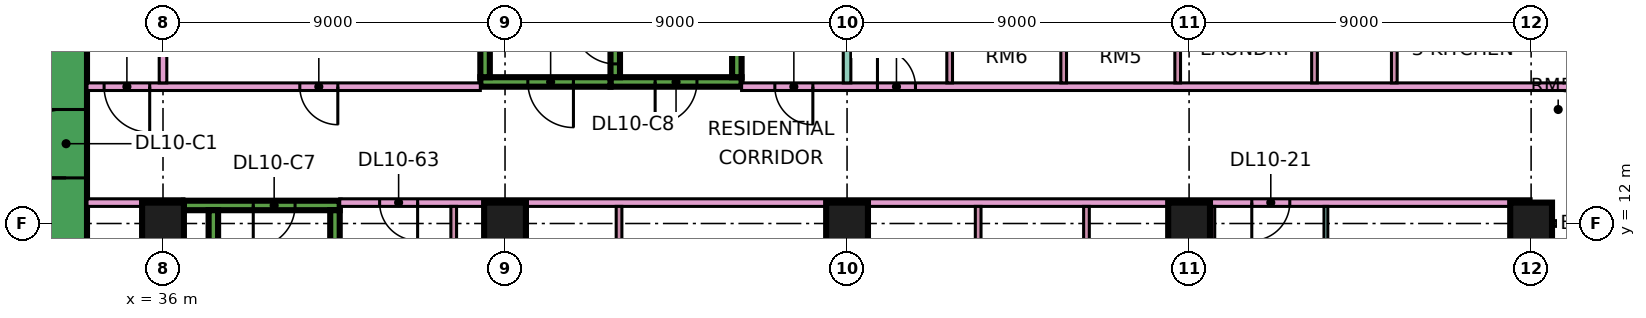
"""IFC4 building model, lengths in metres.
Left out: names, types, materials, properties, quantities, classifications, styles, units other than length and angle.
Written with IfcOpenShell. Run it as: python <this file> out.ifc"""

import sys

from ifc_helpers import new_model, si_unit, direction, frame, frame_2d, origin, origin_2d, place, context, subcontext, project, spatial, rectangle, extrude, element, fill, save


model = new_model("IFC4")
c1 = context("Model", 3, precision=1e-05, world=origin(), true_north=direction((0.0, 1.0)))
c2 = subcontext(c1, "Body", "Model", "MODEL_VIEW")
j1 = project(units=[si_unit("LENGTHUNIT", "METRE"), si_unit("PLANEANGLEUNIT", "RADIAN")], contexts=[c1])
p1 = place(None, origin())
s1 = spatial("IfcSite", under=j1, at=p1, CompositionType="ELEMENT")
p2 = place(p1, origin())
s2 = spatial("IfcBuilding", under=s1, at=p2, CompositionType="ELEMENT")
p3 = place(p2, frame((0.0, 0.0, 52.65)))
s3 = spatial("IfcBuildingStorey", under=s2, at=p3, CompositionType="ELEMENT", Elevation=52.65)
for number, where, z_axis, x_axis in (
    (1, (36.0, 12.0, 0.0), (0.0, 0.0, 1.0), (1.0, 0.0, 0.0)),
    (2, (45.0, 12.0, 0.0), (0.0, 0.0, 1.0), (1.0, 0.0, 0.0)),
    (3, (54.0, 12.0, 0.0), (0.0, 0.0, 1.0), (1.0, 0.0, 0.0)),
    (4, (63.0, 12.0, 0.0), (0.0, 0.0, 1.0), (1.0, 0.0, 0.0)),
    (5, (72.0, 12.0, 0.0), (0.0, 0.0, 1.0), (1.0, 0.0, 0.0)),
):
    element("IfcColumn", number, at=place(p3, frame(where, z_axis=z_axis, x_axis=x_axis)), inside=s3, PredefinedType="COLUMN", context=c2, shape_type="SweptSolid", body=[
        extrude(rectangle(XDim=1.1, YDim=1.1, at=origin_2d()), origin(), (0.0, 0.0, 1.0), 3.75),
    ])
p4 = place(p3, frame((33.45, 8.1, 0.0), z_axis=(0.0, 0.0, 1.0), x_axis=(0.0, 1.0, 0.0)))
e6 = element("IfcWall", 6, at=p4, inside=s3, PredefinedType="SHEAR", context=c2, shape_type="SweptSolid", body=[
    extrude(rectangle(XDim=10.8, YDim=1.1, at=frame_2d((5.4, 0.0))), origin(), (0.0, 0.0, 1.0), 3.75),
])
p5 = place(p4, frame((5.1, 0.0, 0.0)))
e7 = element("IfcOpeningElement", 7, at=p5, cuts=e6, PredefinedType="OPENING", context=c2, shape_type="SweptSolid", body=[
    extrude(rectangle(XDim=1.8, YDim=2.4, at=frame_2d((0.9, 1.2))), frame((0.0, 0.56, 0.0), z_axis=(0.0, -1.0, 0.0), x_axis=(1.0, 0.0, 0.0)), (0.0, 0.0, 1.0), 1.12),
])
p6 = place(p3, frame((36.55, 12.475, 0.0), z_axis=(0.0, 0.0, 1.0), x_axis=(1.0, 0.0, 0.0)))
e8 = element("IfcWall", 8, at=p6, inside=s3, PredefinedType="SHEAR", context=c2, shape_type="SweptSolid", body=[
    extrude(rectangle(XDim=4.1, YDim=0.25, at=frame_2d((2.05, 0.0))), origin(), (0.0, 0.0, 1.0), 3.75),
])
p7 = place(p6, frame((1.825, 0.0, 0.0)))
e9 = element("IfcOpeningElement", 9, at=p7, cuts=e8, PredefinedType="OPENING", context=c2, shape_type="SweptSolid", body=[
    extrude(rectangle(XDim=1.1, YDim=2.2, at=frame_2d((0.55, 1.1))), frame((0.0, 0.135, 0.0), z_axis=(0.0, -1.0, 0.0), x_axis=(1.0, 0.0, 0.0)), (0.0, 0.0, 1.0), 0.27),
])
for number, where, z_axis, x_axis in (
    (10, (37.325, 5.85, 0.0), (0.0, 0.0, 1.0), (0.0, 1.0, 0.0)),
    (11, (40.525, 5.85, 0.0), (0.0, 0.0, 1.0), (0.0, 1.0, 0.0)),
):
    element("IfcWall", number, at=place(p3, frame(where, z_axis=z_axis, x_axis=x_axis)), inside=s3, PredefinedType="SHEAR", context=c2, shape_type="SweptSolid", body=[
        extrude(rectangle(XDim=6.5, YDim=0.25, at=frame_2d((3.25, 0.0))), origin(), (0.0, 0.0, 1.0), 3.75),
    ])
p8 = place(p3, frame((47.775, 15.725, 0.0), z_axis=(0.0, 0.0, 1.0), x_axis=(1.0, 0.0, 0.0)))
e12 = element("IfcWall", 12, at=p8, inside=s3, PredefinedType="SHEAR", context=c2, shape_type="SweptSolid", body=[
    extrude(rectangle(XDim=3.45, YDim=0.25, at=frame_2d((1.725, 0.0))), origin(), (0.0, 0.0, 1.0), 3.75),
])
p9 = place(p8, frame((1.175, 0.0, 0.0)))
e13 = element("IfcOpeningElement", 13, at=p9, cuts=e12, PredefinedType="OPENING", context=c2, shape_type="SweptSolid", body=[
    extrude(rectangle(XDim=1.1, YDim=2.2, at=frame_2d((0.55, 1.1))), frame((0.0, 0.135, 0.0), z_axis=(0.0, -1.0, 0.0), x_axis=(1.0, 0.0, 0.0)), (0.0, 0.0, 1.0), 0.27),
])
p10 = place(p3, frame((47.9, 15.85, 0.0), z_axis=(0.0, 0.0, 1.0), x_axis=(0.0, 1.0, 0.0)))
e14 = element("IfcWall", 14, at=p10, inside=s3, PredefinedType="SHEAR", context=c2, shape_type="SweptSolid", body=[
    extrude(rectangle(XDim=6.5, YDim=0.25, at=frame_2d((3.25, 0.0))), origin(), (0.0, 0.0, 1.0), 3.75),
])
p11 = place(p10, frame((0.35, 0.0, 0.0)))
e15 = element("IfcOpeningElement", 15, at=p11, cuts=e14, PredefinedType="OPENING", context=c2, shape_type="SweptSolid", body=[
    extrude(rectangle(XDim=1.1, YDim=2.2, at=frame_2d((0.55, 1.1))), frame((0.0, 0.135, 0.0), z_axis=(0.0, -1.0, 0.0), x_axis=(1.0, 0.0, 0.0)), (0.0, 0.0, 1.0), 0.27),
])
p12 = place(p3, frame((51.1, 15.85, 0.0), z_axis=(0.0, 0.0, 1.0), x_axis=(0.0, 1.0, 0.0)))
e16 = element("IfcWall", 16, at=p12, inside=s3, PredefinedType="SHEAR", context=c2, shape_type="SweptSolid", body=[
    extrude(rectangle(XDim=6.5, YDim=0.25, at=frame_2d((3.25, 0.0))), origin(), (0.0, 0.0, 1.0), 3.75),
])
p13 = place(p3, frame((44.35, 15.725, 0.0), z_axis=(0.0, 0.0, 1.0), x_axis=(1.0, 0.0, 0.0)))
e17 = element("IfcWall", 17, at=p13, inside=s3, PredefinedType="SHEAR", context=c2, shape_type="SweptSolid", body=[
    extrude(rectangle(XDim=3.425, YDim=0.25, at=frame_2d((1.712, 0.0))), origin(), (0.0, 0.0, 1.0), 3.75),
])
p14 = place(p13, frame((1.25, 0.0, 0.0)))
e18 = element("IfcOpeningElement", 18, at=p14, cuts=e17, PredefinedType="OPENING", context=c2, shape_type="SweptSolid", body=[
    extrude(rectangle(XDim=1.2, YDim=2.2, at=frame_2d((0.6, 1.1))), frame((0.0, 0.135, 0.0), z_axis=(0.0, -1.0, 0.0), x_axis=(1.0, 0.0, 0.0)), (0.0, 0.0, 1.0), 0.27),
])
p15 = place(p3, frame((44.475, 15.85, 0.0), z_axis=(0.0, 0.0, 1.0), x_axis=(0.0, 1.0, 0.0)))
e19 = element("IfcWall", 19, at=p15, inside=s3, PredefinedType="SHEAR", context=c2, shape_type="SweptSolid", body=[
    extrude(rectangle(XDim=6.5, YDim=0.25, at=frame_2d((3.25, 0.0))), origin(), (0.0, 0.0, 1.0), 3.75),
])
p16 = place(p15, frame((1.75, 0.0, 0.0)))
e20 = element("IfcOpeningElement", 20, at=p16, cuts=e19, PredefinedType="OPENING", context=c2, shape_type="SweptSolid", body=[
    extrude(rectangle(XDim=1.1, YDim=2.2, at=frame_2d((0.55, 1.1))), frame((0.0, 0.135, 0.0), z_axis=(0.0, -1.0, 0.0), x_axis=(1.0, 0.0, 0.0)), (0.0, 0.0, 1.0), 0.27),
])
p17 = place(p15, frame((4.3, 0.0, 0.0)))
e21 = element("IfcOpeningElement", 21, at=p17, cuts=e19, PredefinedType="OPENING", context=c2, shape_type="SweptSolid", body=[
    extrude(rectangle(XDim=1.1, YDim=2.2, at=frame_2d((0.55, 1.1))), frame((0.0, 0.135, 0.0), z_axis=(0.0, -1.0, 0.0), x_axis=(1.0, 0.0, 0.0)), (0.0, 0.0, 1.0), 0.27),
])
p18 = place(p3, frame((72.0, 1.575, 0.0), z_axis=(0.0, 0.0, 1.0), x_axis=(0.0, 1.0, 0.0)))
e22 = element("IfcWall", 22, at=p18, inside=s3, PredefinedType="SOLIDWALL", context=c2, shape_type="SweptSolid", body=[
    extrude(rectangle(XDim=10.35, YDim=0.15, at=frame_2d((5.175, 0.0))), origin(), (0.0, 0.0, 1.0), 3.35),
])
p19 = place(p18, frame((1.288, 0.0, 0.0)))
e23 = element("IfcOpeningElement", 23, at=p19, cuts=e22, PredefinedType="OPENING", context=c2, shape_type="SweptSolid", body=[
    extrude(rectangle(XDim=1.8, YDim=2.4, at=frame_2d((0.9, 1.2))), frame((0.0, 0.085, 0.0), z_axis=(0.0, -1.0, 0.0), x_axis=(1.0, 0.0, 0.0)), (0.0, 0.0, 1.0), 0.17),
])
p20 = place(p18, frame((6.175, 0.0, 0.45)))
e24 = element("IfcOpeningElement", 24, at=p20, cuts=e22, PredefinedType="OPENING", context=c2, shape_type="SweptSolid", body=[
    extrude(rectangle(XDim=3.0, YDim=2.4, at=frame_2d((1.5, 1.2))), frame((0.0, 0.085, 0.0), z_axis=(0.0, -1.0, 0.0), x_axis=(1.0, 0.0, 0.0)), (0.0, 0.0, 1.0), 0.17),
])
p21 = place(p3, frame((73.5, 12.0, 0.0), z_axis=(0.0, 0.0, 1.0), x_axis=(-1.0, 0.0, 0.0)))
e25 = element("IfcWall", 25, at=p21, inside=s3, PredefinedType="SOLIDWALL", context=c2, shape_type="SweptSolid", body=[
    extrude(rectangle(XDim=1.5, YDim=0.15, at=frame_2d((0.75, 0.0))), origin(), (0.0, 0.0, 1.0), 3.35),
])
p22 = place(p3, frame((34.0, 12.55, 0.0), z_axis=(0.0, 0.0, 1.0), x_axis=(1.0, 0.0, 0.0)))
e26 = element("IfcWall", 26, at=p22, inside=s3, PredefinedType="PARTITIONING", context=c2, shape_type="SweptSolid", body=[
    extrude(rectangle(XDim=2.551, YDim=0.2, at=frame_2d((1.275, 0.0))), origin(), (0.0, 0.0, 1.0), 3.35),
])
p23 = place(p3, frame((34.0, 15.6, 0.0), z_axis=(0.0, 0.0, 1.0), x_axis=(1.0, 0.0, 0.0)))
e27 = element("IfcWall", 27, at=p23, inside=s3, PredefinedType="PARTITIONING", context=c2, shape_type="SweptSolid", body=[
    extrude(rectangle(XDim=10.35, YDim=0.2, at=frame_2d((5.175, 0.0))), origin(), (0.0, 0.0, 1.0), 3.35),
])
p24 = place(p23, frame((5.6, 0.0, 0.0)))
e28 = element("IfcOpeningElement", 28, at=p24, cuts=e27, PredefinedType="OPENING", context=c2, shape_type="SweptSolid", body=[
    extrude(rectangle(XDim=1.0, YDim=2.1, at=frame_2d((0.5, 1.05))), frame((0.0, 0.11, 0.0), z_axis=(0.0, -1.0, 0.0), x_axis=(1.0, 0.0, 0.0)), (0.0, 0.0, 1.0), 0.22),
])
p25 = place(p23, frame((0.45, 0.0, 0.0)))
e29 = element("IfcOpeningElement", 29, at=p25, cuts=e27, PredefinedType="OPENING", context=c2, shape_type="SweptSolid", body=[
    extrude(rectangle(XDim=1.2, YDim=2.1, at=frame_2d((0.6, 1.05))), frame((0.0, 0.11, 0.0), z_axis=(0.0, -1.0, 0.0), x_axis=(1.0, 0.0, 0.0)), (0.0, 0.0, 1.0), 0.22),
])
p26 = place(p3, frame((36.0, 15.7, 0.0), z_axis=(0.0, 0.0, 1.0), x_axis=(0.0, 1.0, 0.0)))
e30 = element("IfcWall", 30, at=p26, inside=s3, PredefinedType="PARTITIONING", context=c2, shape_type="SweptSolid", body=[
    extrude(rectangle(XDim=8.3, YDim=0.2, at=frame_2d((4.15, 0.0))), origin(), (0.0, 0.0, 1.0), 3.35),
])
p27 = place(p3, frame((40.65, 12.55, 0.0), z_axis=(0.0, 0.0, 1.0), x_axis=(1.0, 0.0, 0.0)))
e31 = element("IfcWall", 31, at=p27, inside=s3, PredefinedType="PARTITIONING", context=c2, shape_type="SweptSolid", body=[
    extrude(rectangle(XDim=31.35, YDim=0.2, at=frame_2d((15.675, 0.0))), origin(), (0.0, 0.0, 1.0), 3.35),
])
p28 = place(p27, frame((24.0, 0.0, 0.0)))
e32 = element("IfcOpeningElement", 32, at=p28, cuts=e31, PredefinedType="OPENING", context=c2, shape_type="SweptSolid", body=[
    extrude(rectangle(XDim=1.0, YDim=2.1, at=frame_2d((0.5, 1.05))), frame((0.0, 0.11, 0.0), z_axis=(0.0, -1.0, 0.0), x_axis=(1.0, 0.0, 0.0)), (0.0, 0.0, 1.0), 0.22),
])
p29 = place(p27, frame((1.05, 0.0, 0.0)))
e33 = element("IfcOpeningElement", 33, at=p29, cuts=e31, PredefinedType="OPENING", context=c2, shape_type="SweptSolid", body=[
    extrude(rectangle(XDim=1.0, YDim=2.1, at=frame_2d((0.5, 1.05))), frame((0.0, 0.11, 0.0), z_axis=(0.0, -1.0, 0.0), x_axis=(1.0, 0.0, 0.0)), (0.0, 0.0, 1.0), 0.22),
])
p30 = place(p3, frame((43.65, 5.975, 0.0), z_axis=(0.0, 0.0, 1.0), x_axis=(0.0, 1.0, 0.0)))
e34 = element("IfcWall", 34, at=p30, inside=s3, PredefinedType="PARTITIONING", context=c2, shape_type="SweptSolid", body=[
    extrude(rectangle(XDim=6.475, YDim=0.15, at=frame_2d((3.237, 0.0))), origin(), (0.0, 0.0, 1.0), 3.35),
])
p31 = place(p30, frame((4.275, 0.0, 0.0)))
e35 = element("IfcOpeningElement", 35, at=p31, cuts=e34, PredefinedType="OPENING", context=c2, shape_type="SweptSolid", body=[
    extrude(rectangle(XDim=0.9, YDim=2.1, at=frame_2d((0.45, 1.05))), frame((0.0, 0.085, 0.0), z_axis=(0.0, -1.0, 0.0), x_axis=(1.0, 0.0, 0.0)), (0.0, 0.0, 1.0), 0.17),
])
p32 = place(p3, frame((48.0, 5.975, 0.0), z_axis=(0.0, 0.0, 1.0), x_axis=(0.0, 1.0, 0.0)))
e36 = element("IfcWall", 36, at=p32, inside=s3, PredefinedType="PARTITIONING", context=c2, shape_type="SweptSolid", body=[
    extrude(rectangle(XDim=6.475, YDim=0.15, at=frame_2d((3.237, 0.0))), origin(), (0.0, 0.0, 1.0), 3.35),
])
p33 = place(p3, frame((51.225, 15.6, 0.0), z_axis=(0.0, 0.0, 1.0), x_axis=(1.0, 0.0, 0.0)))
e37 = element("IfcWall", 37, at=p33, inside=s3, PredefinedType="PARTITIONING", context=c2, shape_type="SweptSolid", body=[
    extrude(rectangle(XDim=22.125, YDim=0.2, at=frame_2d((11.062, 0.0))), origin(), (0.0, 0.0, 1.0), 3.35),
])
p34 = place(p33, frame((3.575, 0.0, 0.0)))
e38 = element("IfcOpeningElement", 38, at=p34, cuts=e37, PredefinedType="OPENING", context=c2, shape_type="SweptSolid", body=[
    extrude(rectangle(XDim=1.0, YDim=2.1, at=frame_2d((0.5, 1.05))), frame((0.0, 0.11, 0.0), z_axis=(0.0, -1.0, 0.0), x_axis=(1.0, 0.0, 0.0)), (0.0, 0.0, 1.0), 0.22),
])
p35 = place(p33, frame((0.875, 0.0, 0.0)))
e39 = element("IfcOpeningElement", 39, at=p35, cuts=e37, PredefinedType="OPENING", context=c2, shape_type="SweptSolid", body=[
    extrude(rectangle(XDim=1.0, YDim=2.1, at=frame_2d((0.5, 1.05))), frame((0.0, 0.11, 0.0), z_axis=(0.0, -1.0, 0.0), x_axis=(1.0, 0.0, 0.0)), (0.0, 0.0, 1.0), 0.22),
])
p36 = place(p3, frame((54.0, 5.9, 0.0), z_axis=(0.0, 0.0, 1.0), x_axis=(0.0, 1.0, 0.0)))
e40 = element("IfcWall", 40, at=p36, inside=s3, PredefinedType="PARTITIONING", context=c2, shape_type="SweptSolid", body=[
    extrude(rectangle(XDim=6.55, YDim=0.2, at=frame_2d((3.275, 0.0))), origin(), (0.0, 0.0, 1.0), 3.35),
])
p37 = place(p3, frame((54.0, 15.7, 0.0), z_axis=(0.0, 0.0, 1.0), x_axis=(0.0, 1.0, 0.0)))
e41 = element("IfcWall", 41, at=p37, inside=s3, PredefinedType="PARTITIONING", context=c2, shape_type="SweptSolid", body=[
    extrude(rectangle(XDim=8.226, YDim=0.2, at=frame_2d((4.113, 0.0))), origin(), (0.0, 0.0, 1.0), 3.35),
])
p38 = place(p3, frame((56.7, 15.7, 0.0), z_axis=(0.0, 0.0, 1.0), x_axis=(0.0, 1.0, 0.0)))
e42 = element("IfcWall", 42, at=p38, inside=s3, PredefinedType="PARTITIONING", context=c2, shape_type="SweptSolid", body=[
    extrude(rectangle(XDim=2.525, YDim=0.15, at=frame_2d((1.263, 0.0))), origin(), (0.0, 0.0, 1.0), 3.35),
])
p39 = place(p3, frame((57.45, 7.225, 0.0), z_axis=(0.0, 0.0, 1.0), x_axis=(0.0, 1.0, 0.0)))
e43 = element("IfcWall", 43, at=p39, inside=s3, PredefinedType="PARTITIONING", context=c2, shape_type="SweptSolid", body=[
    extrude(rectangle(XDim=5.225, YDim=0.15, at=frame_2d((2.612, 0.0))), origin(), (0.0, 0.0, 1.0), 3.35),
])
p40 = place(p3, frame((59.7, 15.7, 0.0), z_axis=(0.0, 0.0, 1.0), x_axis=(0.0, 1.0, 0.0)))
e44 = element("IfcWall", 44, at=p40, inside=s3, PredefinedType="PARTITIONING", context=c2, shape_type="SweptSolid", body=[
    extrude(rectangle(XDim=2.525, YDim=0.15, at=frame_2d((1.263, 0.0))), origin(), (0.0, 0.0, 1.0), 3.35),
])
p41 = place(p3, frame((60.3, 7.225, 0.0), z_axis=(0.0, 0.0, 1.0), x_axis=(0.0, 1.0, 0.0)))
e45 = element("IfcWall", 45, at=p41, inside=s3, PredefinedType="PARTITIONING", context=c2, shape_type="SweptSolid", body=[
    extrude(rectangle(XDim=5.225, YDim=0.15, at=frame_2d((2.612, 0.0))), origin(), (0.0, 0.0, 1.0), 3.35),
])
p42 = place(p3, frame((62.7, 15.7, 0.0), z_axis=(0.0, 0.0, 1.0), x_axis=(0.0, 1.0, 0.0)))
e46 = element("IfcWall", 46, at=p42, inside=s3, PredefinedType="PARTITIONING", context=c2, shape_type="SweptSolid", body=[
    extrude(rectangle(XDim=2.525, YDim=0.15, at=frame_2d((1.263, 0.0))), origin(), (0.0, 0.0, 1.0), 3.35),
])
p43 = place(p3, frame((63.6, 7.225, 0.0), z_axis=(0.0, 0.0, 1.0), x_axis=(0.0, 1.0, 0.0)))
e47 = element("IfcWall", 47, at=p43, inside=s3, PredefinedType="PARTITIONING", context=c2, shape_type="SweptSolid", body=[
    extrude(rectangle(XDim=5.225, YDim=0.15, at=frame_2d((2.612, 0.0))), origin(), (0.0, 0.0, 1.0), 3.35),
])
p44 = place(p3, frame((66.3, 15.7, 0.0), z_axis=(0.0, 0.0, 1.0), x_axis=(0.0, 1.0, 0.0)))
e48 = element("IfcWall", 48, at=p44, inside=s3, PredefinedType="PARTITIONING", context=c2, shape_type="SweptSolid", body=[
    extrude(rectangle(XDim=2.525, YDim=0.15, at=frame_2d((1.263, 0.0))), origin(), (0.0, 0.0, 1.0), 3.35),
])
p45 = place(p3, frame((66.6, 7.1, 0.0), z_axis=(0.0, 0.0, 1.0), x_axis=(0.0, 1.0, 0.0)))
e49 = element("IfcWall", 49, at=p45, inside=s3, PredefinedType="PARTITIONING", context=c2, shape_type="SweptSolid", body=[
    extrude(rectangle(XDim=5.35, YDim=0.1, at=frame_2d((2.675, 0.0))), origin(), (0.0, 0.0, 1.0), 3.35),
])
p46 = place(p45, frame((2.3, 0.0, 0.0)))
e50 = element("IfcOpeningElement", 50, at=p46, cuts=e49, PredefinedType="OPENING", context=c2, shape_type="SweptSolid", body=[
    extrude(rectangle(XDim=0.9, YDim=2.1, at=frame_2d((0.45, 1.05))), frame((0.0, 0.06, 0.0), z_axis=(0.0, -1.0, 0.0), x_axis=(1.0, 0.0, 0.0)), (0.0, 0.0, 1.0), 0.12),
])
p47 = place(p3, frame((68.4, 15.7, 0.0), z_axis=(0.0, 0.0, 1.0), x_axis=(0.0, 1.0, 0.0)))
e51 = element("IfcWall", 51, at=p47, inside=s3, PredefinedType="PARTITIONING", context=c2, shape_type="SweptSolid", body=[
    extrude(rectangle(XDim=2.525, YDim=0.15, at=frame_2d((1.263, 0.0))), origin(), (0.0, 0.0, 1.0), 3.35),
])
p48 = place(p5, origin())
e52 = element("IfcDoor", 52, at=p48, inside=s3, OperationType="DOUBLE_DOOR_SINGLE_SWING", PredefinedType="DOOR", context=c2, shape_type="SweptSolid", body=[
    extrude(rectangle(XDim=1.8, YDim=2.4, at=frame_2d((0.9, 1.2))), frame((0.0, 0.025, 0.0), z_axis=(0.0, -1.0, 0.0), x_axis=(1.0, 0.0, 0.0)), (0.0, 0.0, 1.0), 0.05),
])
fill(e7, e52)
p49 = place(p7, frame((1.1, 0.0, 0.0), z_axis=(0.0, 0.0, 1.0), x_axis=(-1.0, 0.0, 0.0)))
e53 = element("IfcDoor", 53, at=p49, inside=s3, OperationType="SINGLE_SWING_LEFT", PredefinedType="DOOR", context=c2, shape_type="SweptSolid", body=[
    extrude(rectangle(XDim=1.1, YDim=2.2, at=frame_2d((0.55, 1.1))), frame((0.0, 0.025, 0.0), z_axis=(0.0, -1.0, 0.0), x_axis=(1.0, 0.0, 0.0)), (0.0, 0.0, 1.0), 0.05),
])
fill(e9, e53)
p50 = place(p9, frame((1.1, 0.0, 0.0), z_axis=(0.0, 0.0, 1.0), x_axis=(-1.0, 0.0, 0.0)))
e54 = element("IfcDoor", 54, at=p50, inside=s3, OperationType="SINGLE_SWING_LEFT", PredefinedType="DOOR", context=c2, shape_type="SweptSolid", body=[
    extrude(rectangle(XDim=1.1, YDim=2.2, at=frame_2d((0.55, 1.1))), frame((0.0, 0.025, 0.0), z_axis=(0.0, -1.0, 0.0), x_axis=(1.0, 0.0, 0.0)), (0.0, 0.0, 1.0), 0.05),
])
fill(e13, e54)
p51 = place(p14, origin())
e55 = element("IfcDoor", 55, at=p51, inside=s3, OperationType="SINGLE_SWING_RIGHT", PredefinedType="DOOR", context=c2, shape_type="SweptSolid", body=[
    extrude(rectangle(XDim=1.2, YDim=2.2, at=frame_2d((0.6, 1.1))), frame((0.0, 0.025, 0.0), z_axis=(0.0, -1.0, 0.0), x_axis=(1.0, 0.0, 0.0)), (0.0, 0.0, 1.0), 0.05),
])
fill(e18, e55)
p52 = place(p11, frame((1.1, 0.0, 0.0), z_axis=(0.0, 0.0, 1.0), x_axis=(-1.0, 0.0, 0.0)))
e56 = element("IfcDoor", 56, at=p52, inside=s3, OperationType="SINGLE_SWING_RIGHT", PredefinedType="DOOR", context=c2, shape_type="SweptSolid", body=[
    extrude(rectangle(XDim=1.1, YDim=2.2, at=frame_2d((0.55, 1.1))), frame((0.0, 0.025, 0.0), z_axis=(0.0, -1.0, 0.0), x_axis=(1.0, 0.0, 0.0)), (0.0, 0.0, 1.0), 0.05),
])
fill(e15, e56)
p53 = place(p24, origin())
e57 = element("IfcDoor", 57, at=p53, inside=s3, OperationType="SINGLE_SWING_RIGHT", PredefinedType="DOOR", context=c2, shape_type="SweptSolid", body=[
    extrude(rectangle(XDim=1.0, YDim=2.1, at=frame_2d((0.5, 1.05))), frame((0.0, 0.025, 0.0), z_axis=(0.0, -1.0, 0.0), x_axis=(1.0, 0.0, 0.0)), (0.0, 0.0, 1.0), 0.05),
])
fill(e28, e57)
p54 = place(p34, origin())
e58 = element("IfcDoor", 58, at=p54, inside=s3, OperationType="SINGLE_SWING_LEFT", PredefinedType="DOOR", context=c2, shape_type="SweptSolid", body=[
    extrude(rectangle(XDim=1.0, YDim=2.1, at=frame_2d((0.5, 1.05))), frame((0.0, 0.025, 0.0), z_axis=(0.0, -1.0, 0.0), x_axis=(1.0, 0.0, 0.0)), (0.0, 0.0, 1.0), 0.05),
])
fill(e38, e58)
p55 = place(p28, frame((1.0, 0.0, 0.0), z_axis=(0.0, 0.0, 1.0), x_axis=(-1.0, 0.0, 0.0)))
e59 = element("IfcDoor", 59, at=p55, inside=s3, OperationType="SINGLE_SWING_LEFT", PredefinedType="DOOR", context=c2, shape_type="SweptSolid", body=[
    extrude(rectangle(XDim=1.0, YDim=2.1, at=frame_2d((0.5, 1.05))), frame((0.0, 0.025, 0.0), z_axis=(0.0, -1.0, 0.0), x_axis=(1.0, 0.0, 0.0)), (0.0, 0.0, 1.0), 0.05),
])
fill(e32, e59)
p56 = place(p25, origin())
e60 = element("IfcDoor", 60, at=p56, inside=s3, OperationType="SINGLE_SWING_RIGHT", PredefinedType="DOOR", context=c2, shape_type="SweptSolid", body=[
    extrude(rectangle(XDim=1.2, YDim=2.1, at=frame_2d((0.6, 1.05))), frame((0.0, 0.025, 0.0), z_axis=(0.0, -1.0, 0.0), x_axis=(1.0, 0.0, 0.0)), (0.0, 0.0, 1.0), 0.05),
])
fill(e29, e60)
p57 = place(p35, origin())
e61 = element("IfcDoor", 61, at=p57, inside=s3, OperationType="SINGLE_SWING_RIGHT", PredefinedType="DOOR", context=c2, shape_type="SweptSolid", body=[
    extrude(rectangle(XDim=1.0, YDim=2.1, at=frame_2d((0.5, 1.05))), frame((0.0, 0.025, 0.0), z_axis=(0.0, -1.0, 0.0), x_axis=(1.0, 0.0, 0.0)), (0.0, 0.0, 1.0), 0.05),
])
fill(e39, e61)
p58 = place(p29, origin())
e62 = element("IfcDoor", 62, at=p58, inside=s3, OperationType="SINGLE_SWING_RIGHT", PredefinedType="DOOR", context=c2, shape_type="SweptSolid", body=[
    extrude(rectangle(XDim=1.0, YDim=2.1, at=frame_2d((0.5, 1.05))), frame((0.0, 0.025, 0.0), z_axis=(0.0, -1.0, 0.0), x_axis=(1.0, 0.0, 0.0)), (0.0, 0.0, 1.0), 0.05),
])
fill(e33, e62)
save(model, sys.argv[1])
